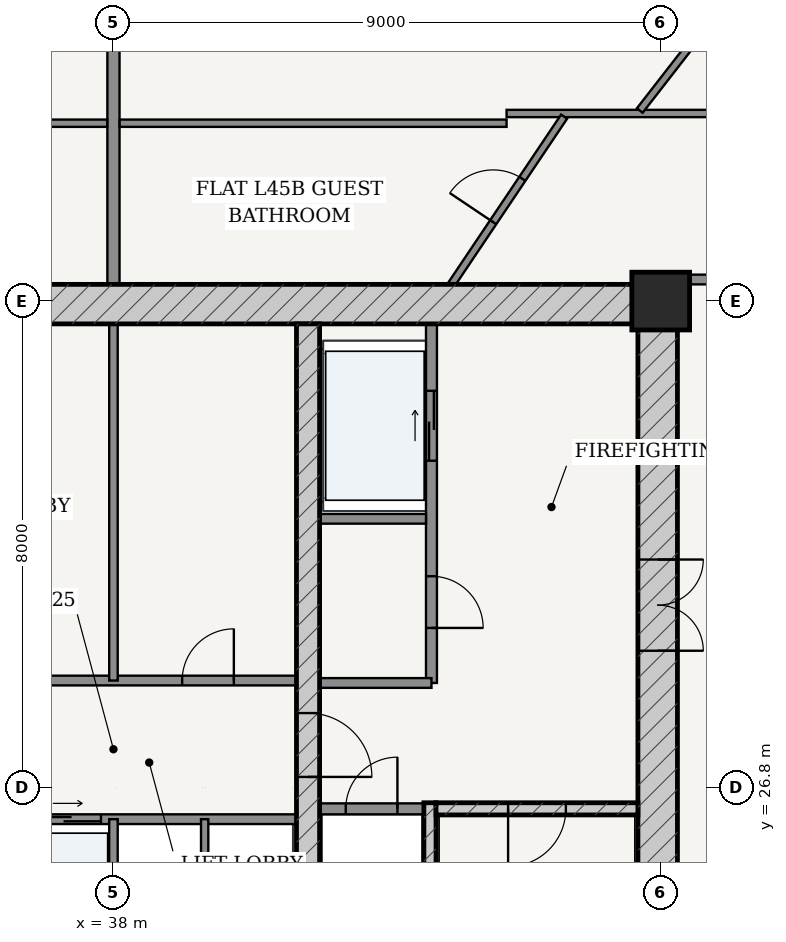
"""IFC4 building model, lengths in metres.
Left out: names, types, materials, properties, quantities, classifications, styles, units other than length and angle.
Written with IfcOpenShell. Run it as: python <this file> out.ifc"""

import sys

from ifc_helpers import new_model, si_unit, direction, frame, frame_2d, origin, origin_2d, place, context, subcontext, project, spatial, rectangle, extrude, source, transform, mapped, element, fill, save


model = new_model("IFC4")
c1 = context("Model", 3, precision=1e-05, world=origin(), true_north=direction((-0.2419218956, 0.970295726276)))
c2 = subcontext(c1, "Body", "Model", "MODEL_VIEW")
j1 = project(units=[si_unit("LENGTHUNIT", "METRE"), si_unit("PLANEANGLEUNIT", "RADIAN")], contexts=[c1])
p1 = place(None, origin())
s1 = spatial("IfcSite", under=j1, at=p1, CompositionType="ELEMENT")
p2 = place(p1, origin())
s2 = spatial("IfcBuilding", under=s1, at=p2, CompositionType="ELEMENT")
p3 = place(p2, frame((0.0, 0.0, 171.4)))
s3 = spatial("IfcBuildingStorey", under=s2, at=p3, CompositionType="ELEMENT", Elevation=171.4)
p4 = place(p3, frame((47.0, 34.8, 0.0), z_axis=(0.0, 0.0, 1.0), x_axis=(1.0, 0.0, 0.0)))
e1 = element("IfcColumn", 1, at=p4, inside=s3, PredefinedType="COLUMN", context=c2, shape_type="SweptSolid", body=[
    extrude(rectangle(XDim=0.95, YDim=0.95, at=origin_2d()), origin(), (0.0, 0.0, 1.0), 3.6),
])
p5 = place(p3, frame((28.725, 34.75, 0.0), z_axis=(0.0, 0.0, 1.0), x_axis=(1.0, 0.0, 0.0)))
e2 = element("IfcWall", 2, at=p5, inside=s3, PredefinedType="SHEAR", context=c2, shape_type="SweptSolid", body=[
    extrude(rectangle(XDim=18.55, YDim=0.65, at=frame_2d((9.275, 0.0))), origin(), (0.0, 0.0, 1.0), 3.33),
])
p6 = place(p3, frame((46.95, 19.175, 0.0), z_axis=(0.0, 0.0, 1.0), x_axis=(0.0, 1.0, 0.0)))
e3 = element("IfcWall", 3, at=p6, inside=s3, PredefinedType="SHEAR", context=c2, shape_type="SweptSolid", body=[
    extrude(rectangle(XDim=15.25, YDim=0.65, at=frame_2d((7.625, 0.0))), origin(), (0.0, 0.0, 1.0), 3.33),
])
p7 = place(p6, frame((9.875, 0.0, 0.0)))
e4 = element("IfcOpeningElement", 4, at=p7, cuts=e3, PredefinedType="OPENING", context=c2, shape_type="SweptSolid", body=[
    extrude(rectangle(XDim=1.5, YDim=2.2, at=frame_2d((0.75, 1.1))), frame((0.0, 0.335, 0.0), z_axis=(0.0, -1.0, 0.0), x_axis=(1.0, 0.0, 0.0)), (0.0, 0.0, 1.0), 0.67),
])
p8 = place(p3, frame((43.205, 19.175, 0.0), z_axis=(0.0, 0.0, 1.0), x_axis=(0.0, 1.0, 0.0)))
e5 = element("IfcWall", 5, at=p8, inside=s3, PredefinedType="SOLIDWALL", context=c2, shape_type="SweptSolid", body=[
    extrude(rectangle(XDim=7.375, YDim=0.2, at=frame_2d((3.688, 0.0))), origin(), (0.0, 0.0, 1.0), 3.33),
])
p9 = place(p3, frame((43.305, 26.45, 0.0), z_axis=(0.0, 0.0, 1.0), x_axis=(1.0, 0.0, 0.0)))
e6 = element("IfcWall", 6, at=p9, inside=s3, PredefinedType="SOLIDWALL", context=c2, shape_type="SweptSolid", body=[
    extrude(rectangle(XDim=3.32, YDim=0.2, at=frame_2d((1.66, 0.0))), origin(), (0.0, 0.0, 1.0), 3.33),
])
p10 = place(p9, frame((1.185, 0.0, 0.0)))
e7 = element("IfcOpeningElement", 7, at=p10, cuts=e6, PredefinedType="OPENING", context=c2, shape_type="SweptSolid", body=[
    extrude(rectangle(XDim=0.95, YDim=2.15, at=frame_2d((0.475, 1.075))), frame((0.0, 0.11, 0.0), z_axis=(0.0, -1.0, 0.0), x_axis=(1.0, 0.0, 0.0)), (0.0, 0.0, 1.0), 0.22),
])
p11 = place(p3, frame((41.2, 19.175, 0.0), z_axis=(0.0, 0.0, 1.0), x_axis=(0.0, 1.0, 0.0)))
e8 = element("IfcWall", 8, at=p11, inside=s3, PredefinedType="SHEAR", context=c2, shape_type="SweptSolid", body=[
    extrude(rectangle(XDim=15.25, YDim=0.38, at=frame_2d((7.625, 0.0))), origin(), (0.0, 0.0, 1.0), 3.33),
])
p12 = place(p11, frame((7.8, 0.0, 0.0)))
e9 = element("IfcOpeningElement", 9, at=p12, cuts=e8, PredefinedType="OPENING", context=c2, shape_type="SweptSolid", body=[
    extrude(rectangle(XDim=1.05, YDim=2.15, at=frame_2d((0.525, 1.075))), frame((0.0, 0.2, 0.0), z_axis=(0.0, -1.0, 0.0), x_axis=(1.0, 0.0, 0.0)), (0.0, 0.0, 1.0), 0.4),
])
p13 = place(p3, frame((41.39, 26.45, 0.0), z_axis=(0.0, 0.0, 1.0), x_axis=(1.0, 0.0, 0.0)))
e10 = element("IfcWall", 10, at=p13, inside=s3, PredefinedType="PARTITIONING", context=c2, shape_type="SweptSolid", body=[
    extrude(rectangle(XDim=1.71, YDim=0.18, at=frame_2d((0.855, 0.0))), origin(), (0.0, 0.0, 1.0), 3.33),
])
p14 = place(p13, frame((0.43, 0.0, 0.0)))
e11 = element("IfcOpeningElement", 11, at=p14, cuts=e10, PredefinedType="OPENING", context=c2, shape_type="SweptSolid", body=[
    extrude(rectangle(XDim=0.85, YDim=2.1, at=frame_2d((0.425, 1.05))), frame((0.0, 0.1, 0.0), z_axis=(0.0, -1.0, 0.0), x_axis=(1.0, 0.0, 0.0)), (0.0, 0.0, 1.0), 0.2),
])
p15 = place(p3, frame((43.23, 28.52, 0.0), z_axis=(0.0, 0.0, 1.0), x_axis=(0.0, 1.0, 0.0)))
e12 = element("IfcWall", 12, at=p15, inside=s3, PredefinedType="PARTITIONING", context=c2, shape_type="SweptSolid", body=[
    extrude(rectangle(XDim=5.905, YDim=0.18, at=frame_2d((2.953, 0.0))), origin(), (0.0, 0.0, 1.0), 3.33),
])
p16 = place(p15, frame((0.905, 0.0, 0.0)))
e13 = element("IfcOpeningElement", 13, at=p16, cuts=e12, PredefinedType="OPENING", context=c2, shape_type="SweptSolid", body=[
    extrude(rectangle(XDim=0.85, YDim=2.1, at=frame_2d((0.425, 1.05))), frame((0.0, 0.1, 0.0), z_axis=(0.0, -1.0, 0.0), x_axis=(1.0, 0.0, 0.0)), (0.0, 0.0, 1.0), 0.2),
])
p17 = place(p15, frame((3.655, 0.0, 0.0)))
e14 = element("IfcOpeningElement", 14, at=p17, cuts=e12, PredefinedType="OPENING", context=c2, shape_type="SweptSolid", body=[
    extrude(rectangle(XDim=1.15, YDim=2.2, at=frame_2d((0.575, 1.1))), frame((0.0, 0.1, 0.0), z_axis=(0.0, -1.0, 0.0), x_axis=(1.0, 0.0, 0.0)), (0.0, 0.0, 1.0), 0.2),
])
p18 = place(p3, frame((41.39, 31.22, 0.0), z_axis=(0.0, 0.0, 1.0), x_axis=(1.0, 0.0, 0.0)))
e15 = element("IfcWall", 15, at=p18, inside=s3, PredefinedType="PARTITIONING", context=c2, shape_type="SweptSolid", body=[
    extrude(rectangle(XDim=1.75, YDim=0.16, at=frame_2d((0.875, 0.0))), origin(), (0.0, 0.0, 1.0), 3.33),
])
p19 = place(p3, frame((41.39, 28.52, 0.0), z_axis=(0.0, 0.0, 1.0), x_axis=(1.0, 0.0, 0.0)))
e16 = element("IfcWall", 16, at=p19, inside=s3, PredefinedType="PARTITIONING", context=c2, shape_type="SweptSolid", body=[
    extrude(rectangle(XDim=1.84, YDim=0.16, at=frame_2d((0.92, 0.0))), origin(), (0.0, 0.0, 1.0), 3.33),
])
p20 = place(p3, frame((34.99, 28.56, 0.0), z_axis=(0.0, 0.0, 1.0), x_axis=(1.0, 0.0, 0.0)))
e17 = element("IfcWall", 17, at=p20, inside=s3, PredefinedType="PARTITIONING", context=c2, shape_type="SweptSolid", body=[
    extrude(rectangle(XDim=6.02, YDim=0.16, at=frame_2d((3.01, 0.0))), origin(), (0.0, 0.0, 1.0), 3.33),
])
p21 = place(p20, frame((1.025, 0.0, 0.0)))
e18 = element("IfcOpeningElement", 18, at=p21, cuts=e17, PredefinedType="OPENING", context=c2, shape_type="SweptSolid", body=[
    extrude(rectangle(XDim=0.86, YDim=2.1, at=frame_2d((0.43, 1.05))), frame((0.0, 0.09, 0.0), z_axis=(0.0, -1.0, 0.0), x_axis=(1.0, 0.0, 0.0)), (0.0, 0.0, 1.0), 0.18),
])
p22 = place(p20, frame((4.14, 0.0, 0.0)))
e19 = element("IfcOpeningElement", 19, at=p22, cuts=e17, PredefinedType="OPENING", context=c2, shape_type="SweptSolid", body=[
    extrude(rectangle(XDim=0.85, YDim=2.1, at=frame_2d((0.425, 1.05))), frame((0.0, 0.09, 0.0), z_axis=(0.0, -1.0, 0.0), x_axis=(1.0, 0.0, 0.0)), (0.0, 0.0, 1.0), 0.18),
])
p23 = place(p3, frame((38.0, 28.56, 0.0), z_axis=(0.0, 0.0, 1.0), x_axis=(0.0, 1.0, 0.0)))
e20 = element("IfcWall", 20, at=p23, inside=s3, PredefinedType="PARTITIONING", context=c2, shape_type="SweptSolid", body=[
    extrude(rectangle(XDim=5.865, YDim=0.14, at=frame_2d((2.933, 0.0))), origin(), (0.0, 0.0, 1.0), 3.33),
])
p24 = place(p3, frame((34.99, 26.28, 0.0), z_axis=(0.0, 0.0, 1.0), x_axis=(1.0, 0.0, 0.0)))
e21 = element("IfcWall", 21, at=p24, inside=s3, PredefinedType="PARTITIONING", context=c2, shape_type="SweptSolid", body=[
    extrude(rectangle(XDim=6.02, YDim=0.16, at=frame_2d((3.01, 0.0))), origin(), (0.0, 0.0, 1.0), 3.33),
])
p25 = place(p24, frame((0.225, 0.0, 0.0)))
e22 = element("IfcOpeningElement", 22, at=p25, cuts=e21, PredefinedType="OPENING", context=c2, shape_type="SweptSolid", body=[
    extrude(rectangle(XDim=1.1, YDim=2.2, at=frame_2d((0.55, 1.1))), frame((0.0, 0.09, 0.0), z_axis=(0.0, -1.0, 0.0), x_axis=(1.0, 0.0, 0.0)), (0.0, 0.0, 1.0), 0.18),
])
p26 = place(p24, frame((1.705, 0.0, 0.0)))
e23 = element("IfcOpeningElement", 23, at=p26, cuts=e21, PredefinedType="OPENING", context=c2, shape_type="SweptSolid", body=[
    extrude(rectangle(XDim=1.1, YDim=2.2, at=frame_2d((0.55, 1.1))), frame((0.0, 0.09, 0.0), z_axis=(0.0, -1.0, 0.0), x_axis=(1.0, 0.0, 0.0)), (0.0, 0.0, 1.0), 0.18),
])
p27 = place(p3, frame((38.0, 23.72, 0.0), z_axis=(0.0, 0.0, 1.0), x_axis=(0.0, 1.0, 0.0)))
e24 = element("IfcWall", 24, at=p27, inside=s3, PredefinedType="PARTITIONING", context=c2, shape_type="SweptSolid", body=[
    extrude(rectangle(XDim=2.56, YDim=0.14, at=frame_2d((1.28, 0.0))), origin(), (0.0, 0.0, 1.0), 3.33),
])
p28 = place(p3, frame((39.5, 23.72, 0.0), z_axis=(0.0, 0.0, 1.0), x_axis=(0.0, 1.0, 0.0)))
e25 = element("IfcWall", 25, at=p28, inside=s3, PredefinedType="PARTITIONING", context=c2, shape_type="SweptSolid", body=[
    extrude(rectangle(XDim=2.56, YDim=0.12, at=frame_2d((1.28, 0.0))), origin(), (0.0, 0.0, 1.0), 3.33),
])
p29 = place(p3, frame((47.275, 35.155, 0.0), z_axis=(0.0, 0.0, 1.0), x_axis=(1.0, 0.0, 0.0)))
e26 = element("IfcWall", 26, at=p29, inside=s3, PredefinedType="PARTITIONING", context=c2, shape_type="SweptSolid", body=[
    extrude(rectangle(XDim=1.93, YDim=0.16, at=frame_2d((0.965, 0.0))), origin(), (0.0, 0.0, 1.0), 2.776),
])
p30 = place(p3, frame((38.0, 35.075, 0.0), z_axis=(0.0, 0.0, 1.0), x_axis=(0.0, 1.0, 0.0)))
e27 = element("IfcWall", 27, at=p30, inside=s3, PredefinedType="PARTITIONING", context=c2, shape_type="SweptSolid", body=[
    extrude(rectangle(XDim=12.465, YDim=0.2, at=frame_2d((6.232, 0.0))), origin(), (0.0, 0.0, 1.0), 2.415),
])
for number, where, z_axis, x_axis in (
    (28, (31.535, 37.725, 0.0), (0.0, 0.0, 1.0), (1.0, 0.0, 0.0)),
    (29, (38.102, 37.725, 0.0), (0.0, 0.0, 1.0), (1.0, 0.0, 0.0)),
):
    element("IfcWall", number, at=place(p3, frame(where, z_axis=z_axis, x_axis=x_axis)), inside=s3, PredefinedType="PARTITIONING", context=c2, shape_type="SweptSolid", body=[
        extrude(rectangle(XDim=6.363, YDim=0.12, at=frame_2d((3.182, 0.0))), origin(), (0.0, 0.0, 1.0), 2.776),
    ])
p31 = place(p3, frame((44.465, 37.885, 0.0), z_axis=(0.0, 0.0, 1.0), x_axis=(1.0, 0.0, 0.0)))
e30 = element("IfcWall", 30, at=p31, inside=s3, PredefinedType="PARTITIONING", context=c2, shape_type="SweptSolid", body=[
    extrude(rectangle(XDim=7.47, YDim=0.12, at=frame_2d((3.735, 0.0))), origin(), (0.0, 0.0, 1.0), 2.776),
])
p32 = place(p31, frame((4.241, 0.0, 0.0)))
e31 = element("IfcOpeningElement", 31, at=p32, cuts=e30, PredefinedType="OPENING", context=c2, shape_type="SweptSolid", body=[
    extrude(rectangle(XDim=0.9, YDim=2.15, at=frame_2d((0.45, 1.075))), frame((0.0, 0.07, 0.0), z_axis=(0.0, -1.0, 0.0), x_axis=(1.0, 0.0, 0.0)), (0.0, 0.0, 1.0), 0.14),
])
p33 = place(p3, frame((46.656, 37.934, 0.0), z_axis=(0.0, 0.0, 1.0), x_axis=(0.613758289074, 0.789493991487, 0.0)))
e32 = element("IfcWall", 32, at=p33, inside=s3, PredefinedType="PARTITIONING", context=c2, shape_type="SweptSolid", body=[
    extrude(rectangle(XDim=7.695, YDim=0.12, at=frame_2d((3.848, 0.0))), origin(), (0.0, 0.0, 1.0), 2.776),
])
p34 = place(p33, frame((2.399, 0.0, 0.0)))
e33 = element("IfcOpeningElement", 33, at=p34, cuts=e32, PredefinedType="OPENING", context=c2, shape_type="SweptSolid", body=[
    extrude(rectangle(XDim=0.9, YDim=2.15, at=frame_2d((0.45, 1.075))), frame((0.0, 0.07, 0.0), z_axis=(0.0, -1.0, 0.0), x_axis=(1.0, 0.0, 0.0)), (0.0, 0.0, 1.0), 0.14),
])
p35 = place(p3, frame((43.559, 35.075, 0.0), z_axis=(0.0, 0.0, 1.0), x_axis=(0.557612855606, 0.830101140381, 0.0)))
e34 = element("IfcWall", 34, at=p35, inside=s3, PredefinedType="PARTITIONING", context=c2, shape_type="SweptSolid", body=[
    extrude(rectangle(XDim=3.323, YDim=0.12, at=frame_2d((1.662, 0.0))), origin(), (0.0, 0.0, 1.0), 3.33),
])
p36 = place(p35, frame((1.232, 0.0, 0.0)))
e35 = element("IfcOpeningElement", 35, at=p36, cuts=e34, PredefinedType="OPENING", context=c2, shape_type="SweptSolid", body=[
    extrude(rectangle(XDim=0.86, YDim=2.15, at=frame_2d((0.43, 1.075))), frame((0.0, 0.07, 0.0), z_axis=(0.0, -1.0, 0.0), x_axis=(1.0, 0.0, 0.0)), (0.0, 0.0, 1.0), 0.14),
])
m1 = source(origin(), c2, "Body", "SweptSolid", [
    extrude(rectangle(XDim=1.5, YDim=2.2, at=frame_2d((0.75, 1.1))), frame((0.0, 0.025, 0.0), z_axis=(0.0, -1.0, 0.0), x_axis=(1.0, 0.0, 0.0)), (0.0, 0.0, 1.0), 0.05),
])
p37 = place(p7, frame((1.5, 0.0, 0.0), z_axis=(0.0, 0.0, 1.0), x_axis=(-1.0, 0.0, 0.0)))
e36 = element("IfcDoor", 36, at=p37, inside=s3, OperationType="DOUBLE_DOOR_SINGLE_SWING", PredefinedType="DOOR", context=c2, shape_type="MappedRepresentation", body=[
    mapped(m1, transform((0.0, 0.0, 0.0), scale=1.0)),
])
fill(e4, e36)
m2 = source(origin(), c2, "Body", "SweptSolid", [
    extrude(rectangle(XDim=1.05, YDim=2.15, at=frame_2d((0.525, 1.075))), frame((0.0, 0.025, 0.0), z_axis=(0.0, -1.0, 0.0), x_axis=(1.0, 0.0, 0.0)), (0.0, 0.0, 1.0), 0.05),
])
p38 = place(p12, frame((1.05, 0.0, 0.0), z_axis=(0.0, 0.0, 1.0), x_axis=(-1.0, 0.0, 0.0)))
e37 = element("IfcDoor", 37, at=p38, inside=s3, OperationType="SINGLE_SWING_RIGHT", PredefinedType="DOOR", context=c2, shape_type="MappedRepresentation", body=[
    mapped(m2, transform((0.0, 0.0, 0.0), scale=1.0)),
])
fill(e9, e37)
m3 = source(origin(), c2, "Body", "SweptSolid", [
    extrude(rectangle(XDim=0.95, YDim=2.15, at=frame_2d((0.475, 1.075))), frame((0.0, 0.025, 0.0), z_axis=(0.0, -1.0, 0.0), x_axis=(1.0, 0.0, 0.0)), (0.0, 0.0, 1.0), 0.05),
])
p39 = place(p10, frame((0.95, 0.0, 0.0), z_axis=(0.0, 0.0, 1.0), x_axis=(-1.0, 0.0, 0.0)))
e38 = element("IfcDoor", 38, at=p39, inside=s3, OperationType="SINGLE_SWING_RIGHT", PredefinedType="DOOR", context=c2, shape_type="MappedRepresentation", body=[
    mapped(m3, transform((0.0, 0.0, 0.0), scale=1.0)),
])
fill(e7, e38)
m4 = source(origin(), c2, "Body", "SweptSolid", [
    extrude(rectangle(XDim=0.85, YDim=2.1, at=frame_2d((0.425, 1.05))), frame((0.0, 0.025, 0.0), z_axis=(0.0, -1.0, 0.0), x_axis=(1.0, 0.0, 0.0)), (0.0, 0.0, 1.0), 0.05),
])
p40 = place(p14, origin())
e39 = element("IfcDoor", 39, at=p40, inside=s3, OperationType="SINGLE_SWING_RIGHT", PredefinedType="DOOR", context=c2, shape_type="MappedRepresentation", body=[
    mapped(m4, transform((0.0, 0.0, 0.0), scale=1.0)),
])
fill(e11, e39)
p41 = place(p16, frame((0.85, 0.0, 0.0), z_axis=(0.0, 0.0, 1.0), x_axis=(-1.0, 0.0, 0.0)))
e40 = element("IfcDoor", 40, at=p41, inside=s3, OperationType="SINGLE_SWING_RIGHT", PredefinedType="DOOR", context=c2, shape_type="MappedRepresentation", body=[
    mapped(m4, transform((0.0, 0.0, 0.0), scale=1.0)),
])
fill(e13, e40)
p42 = place(p22, origin())
e41 = element("IfcDoor", 41, at=p42, inside=s3, OperationType="SINGLE_SWING_RIGHT", PredefinedType="DOOR", context=c2, shape_type="MappedRepresentation", body=[
    mapped(m4, transform((0.0, 0.0, 0.0), scale=1.0)),
])
fill(e19, e41)
m5 = source(origin(), c2, "Body", "SweptSolid", [
    extrude(rectangle(XDim=1.15, YDim=2.2, at=frame_2d((0.575, 1.1))), frame((0.0, 0.025, 0.0), z_axis=(0.0, -1.0, 0.0), x_axis=(1.0, 0.0, 0.0)), (0.0, 0.0, 1.0), 0.05),
])
p43 = place(p17, origin())
e42 = element("IfcDoor", 42, at=p43, inside=s3, OperationType="DOUBLE_DOOR_SLIDING", PredefinedType="DOOR", context=c2, shape_type="MappedRepresentation", body=[
    mapped(m5, transform((0.0, 0.0, 0.0), scale=1.0)),
])
fill(e14, e42)
m6 = source(origin(), c2, "Body", "SweptSolid", [
    extrude(rectangle(XDim=1.1, YDim=2.2, at=frame_2d((0.55, 1.1))), frame((0.0, 0.025, 0.0), z_axis=(0.0, -1.0, 0.0), x_axis=(1.0, 0.0, 0.0)), (0.0, 0.0, 1.0), 0.05),
])
p44 = place(p26, origin())
e43 = element("IfcDoor", 43, at=p44, inside=s3, OperationType="DOUBLE_DOOR_SLIDING", PredefinedType="DOOR", context=c2, shape_type="MappedRepresentation", body=[
    mapped(m6, transform((0.0, 0.0, 0.0), scale=1.0)),
])
fill(e23, e43)
m7 = source(origin(), c2, "Body", "SweptSolid", [
    extrude(rectangle(XDim=0.86, YDim=2.15, at=frame_2d((0.43, 1.075))), frame((0.0, 0.025, 0.0), z_axis=(0.0, -1.0, 0.0), x_axis=(1.0, 0.0, 0.0)), (0.0, 0.0, 1.0), 0.05),
])
p45 = place(p36, origin())
e44 = element("IfcDoor", 44, at=p45, inside=s3, OperationType="SINGLE_SWING_LEFT", PredefinedType="DOOR", context=c2, shape_type="MappedRepresentation", body=[
    mapped(m7, transform((0.0, 0.0, 0.0), scale=1.0)),
])
fill(e35, e44)
save(model, sys.argv[1])
